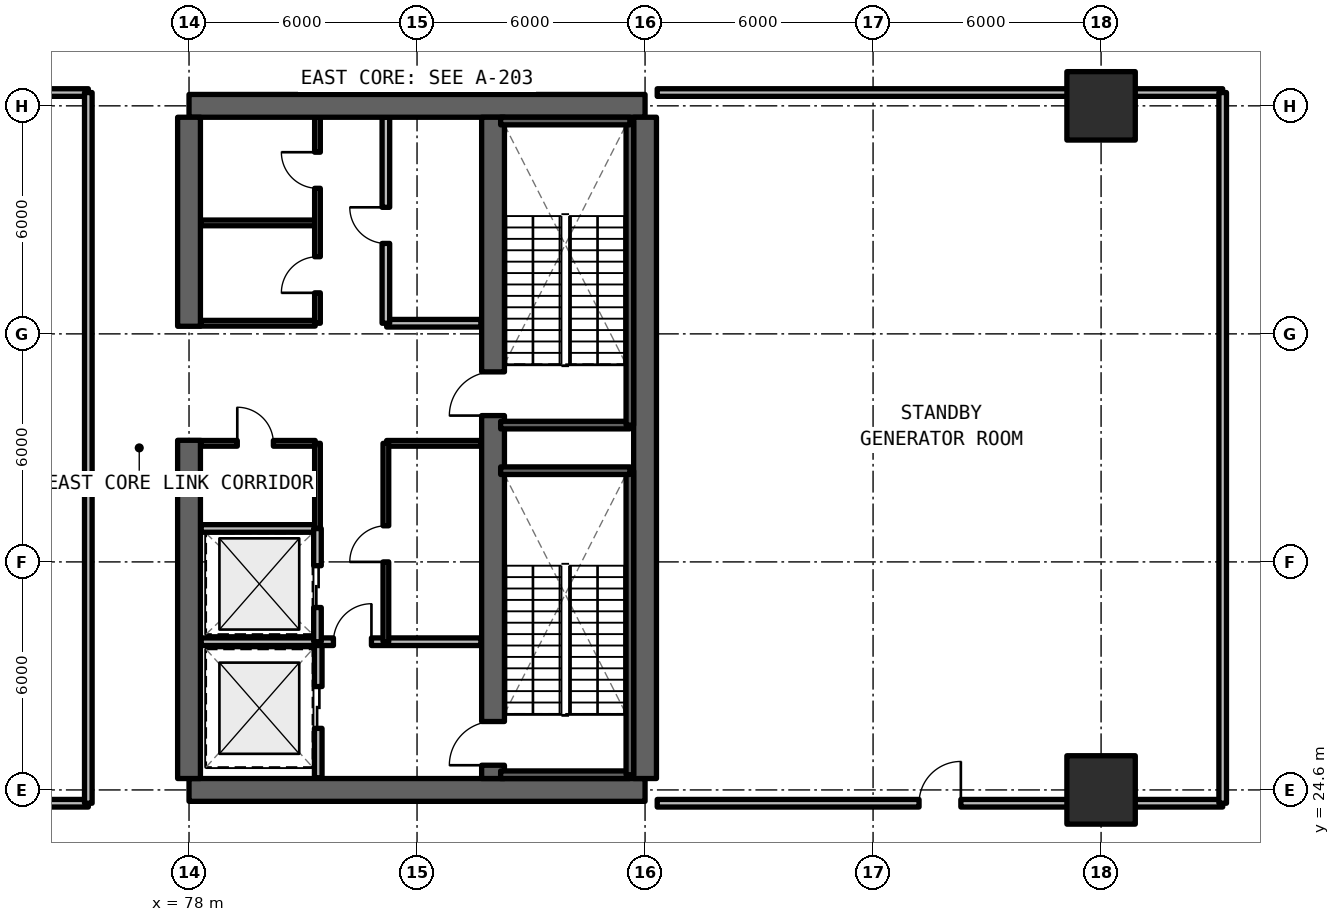
"""IFC4 building model, lengths in metres.
Left out: names, types, materials, properties, quantities, classifications, styles, units other than length and angle.
Written with IfcOpenShell. Run it as: python <this file> out.ifc"""

import sys

from ifc_helpers import new_model, si_unit, direction, frame, frame_2d, origin, origin_2d, place, context, subcontext, project, spatial, rectangle, extrude, element, fill, save


model = new_model("IFC4")
c1 = context("Model", 3, precision=1e-05, world=origin(), true_north=direction((0.0, 1.0)))
c2 = subcontext(c1, "Body", "Model", "MODEL_VIEW")
j1 = project(units=[si_unit("LENGTHUNIT", "METRE"), si_unit("PLANEANGLEUNIT", "RADIAN")], contexts=[c1])
p1 = place(None, origin())
s1 = spatial("IfcSite", under=j1, at=p1, CompositionType="ELEMENT")
p2 = place(p1, origin())
s2 = spatial("IfcBuilding", under=s1, at=p2, CompositionType="ELEMENT")
p3 = place(p2, frame((0.0, 0.0, -4.62)))
s3 = spatial("IfcBuildingStorey", under=s2, at=p3, CompositionType="ELEMENT", Elevation=-4.62)
for number, where, z_axis, x_axis in (
    (1, (78.0, 24.6, 0.0), (0.0, 0.0, 1.0), (1.0, 0.0, 0.0)),
    (2, (90.0, 42.6, 0.0), (0.0, 0.0, 1.0), (-1.0, 0.0, 0.0)),
):
    element("IfcWall", number, at=place(p3, frame(where, z_axis=z_axis, x_axis=x_axis)), inside=s3, PredefinedType="SHEAR", context=c2, shape_type="SweptSolid", body=[
        extrude(rectangle(XDim=12.0, YDim=0.6, at=frame_2d((6.0, 0.0))), origin(), (0.0, 0.0, 1.0), 4.62),
    ])
p4 = place(p3, frame((90.0, 24.9, 0.0), z_axis=(0.0, 0.0, 1.0), x_axis=(0.0, 1.0, 0.0)))
e3 = element("IfcWall", 3, at=p4, inside=s3, PredefinedType="SHEAR", context=c2, shape_type="SweptSolid", body=[
    extrude(rectangle(XDim=17.4, YDim=0.6, at=frame_2d((8.7, 0.0))), origin(), (0.0, 0.0, 1.0), 4.62),
])
p5 = place(p3, frame((78.0, 24.9, 0.0), z_axis=(0.0, 0.0, 1.0), x_axis=(0.0, 1.0, 0.0)))
e4 = element("IfcWall", 4, at=p5, inside=s3, PredefinedType="SHEAR", context=c2, shape_type="SweptSolid", body=[
    extrude(rectangle(XDim=8.9, YDim=0.6, at=frame_2d((4.45, 0.0))), origin(), (0.0, 0.0, 1.0), 4.62),
])
p6 = place(p3, frame((78.0, 36.8, 0.0), z_axis=(0.0, 0.0, 1.0), x_axis=(0.0, 1.0, 0.0)))
e5 = element("IfcWall", 5, at=p6, inside=s3, PredefinedType="SHEAR", context=c2, shape_type="SweptSolid", body=[
    extrude(rectangle(XDim=5.5, YDim=0.6, at=frame_2d((2.75, 0.0))), origin(), (0.0, 0.0, 1.0), 4.62),
])
p7 = place(p3, frame((86.0, 24.9, 0.0), z_axis=(0.0, 0.0, 1.0), x_axis=(0.0, 1.0, 0.0)))
e6 = element("IfcWall", 6, at=p7, inside=s3, PredefinedType="SHEAR", context=c2, shape_type="SweptSolid", body=[
    extrude(rectangle(XDim=17.4, YDim=0.6, at=frame_2d((8.7, 0.0))), origin(), (0.0, 0.0, 1.0), 4.62),
])
p8 = place(p7, frame((0.35, 0.0, 0.0)))
e7 = element("IfcOpeningElement", 7, at=p8, cuts=e6, PredefinedType="OPENING", context=c2, shape_type="SweptSolid", body=[
    extrude(rectangle(XDim=1.15, YDim=2.15, at=frame_2d((0.575, 1.075))), frame((0.0, 0.31, 0.0), z_axis=(0.0, -1.0, 0.0), x_axis=(1.0, 0.0, 0.0)), (0.0, 0.0, 1.0), 0.62),
])
p9 = place(p7, frame((9.55, 0.0, 0.0)))
e8 = element("IfcOpeningElement", 8, at=p9, cuts=e6, PredefinedType="OPENING", context=c2, shape_type="SweptSolid", body=[
    extrude(rectangle(XDim=1.15, YDim=2.15, at=frame_2d((0.575, 1.075))), frame((0.0, 0.31, 0.0), z_axis=(0.0, -1.0, 0.0), x_axis=(1.0, 0.0, 0.0)), (0.0, 0.0, 1.0), 0.62),
])
for number, where, z_axis, x_axis in (
    (9, (102.0, 24.6, 0.0), (0.0, 0.0, 1.0), (1.0, 0.0, 0.0)),
    (10, (102.0, 42.6, 0.0), (0.0, 0.0, 1.0), (1.0, 0.0, 0.0)),
):
    element("IfcColumn", number, at=place(p3, frame(where, z_axis=z_axis, x_axis=x_axis)), inside=s3, PredefinedType="COLUMN", context=c2, shape_type="SweptSolid", body=[
        extrude(rectangle(XDim=1.8, YDim=1.8, at=origin_2d()), origin(), (0.0, 0.0, 1.0), 4.62),
    ])
p10 = place(p3, frame((81.4, 24.92, 0.0), z_axis=(0.0, 0.0, 1.0), x_axis=(0.0, 1.0, 0.0)))
e11 = element("IfcWall", 11, at=p10, inside=s3, PredefinedType="SOLIDWALL", context=c2, shape_type="SweptSolid", body=[
    extrude(rectangle(XDim=3.58, YDim=0.2, at=frame_2d((1.79, 0.0))), origin(), (0.0, 0.0, 1.0), 3.56),
])
p11 = place(p10, frame((1.3, 0.0, 0.0)))
e12 = element("IfcOpeningElement", 12, at=p11, cuts=e11, PredefinedType="OPENING", context=c2, shape_type="SweptSolid", body=[
    extrude(rectangle(XDim=1.1, YDim=2.2, at=frame_2d((0.55, 1.1))), frame((0.0, 0.11, 0.0), z_axis=(0.0, -1.0, 0.0), x_axis=(1.0, 0.0, 0.0)), (0.0, 0.0, 1.0), 0.22),
])
p12 = place(p3, frame((78.32, 28.5, 0.0), z_axis=(0.0, 0.0, 1.0), x_axis=(1.0, 0.0, 0.0)))
e13 = element("IfcWall", 13, at=p12, inside=s3, PredefinedType="SOLIDWALL", context=c2, shape_type="SweptSolid", body=[
    extrude(rectangle(XDim=7.36, YDim=0.2, at=frame_2d((3.68, 0.0))), origin(), (0.0, 0.0, 1.0), 3.56),
])
p13 = place(p12, frame((3.48, 0.0, 0.0)))
e14 = element("IfcOpeningElement", 14, at=p13, cuts=e13, PredefinedType="OPENING", context=c2, shape_type="SweptSolid", body=[
    extrude(rectangle(XDim=1.0, YDim=2.15, at=frame_2d((0.5, 1.075))), frame((0.0, 0.11, 0.0), z_axis=(0.0, -1.0, 0.0), x_axis=(1.0, 0.0, 0.0)), (0.0, 0.0, 1.0), 0.22),
])
p14 = place(p3, frame((83.2, 33.72, 0.0), z_axis=(0.0, 0.0, 1.0), x_axis=(1.0, 0.0, 0.0)))
e15 = element("IfcWall", 15, at=p14, inside=s3, PredefinedType="SOLIDWALL", context=c2, shape_type="SweptSolid", body=[
    extrude(rectangle(XDim=2.48, YDim=0.15, at=frame_2d((1.24, 0.0))), origin(), (0.0, 0.0, 1.0), 3.56),
])
p15 = place(p3, frame((83.18, 28.5, 0.0), z_axis=(0.0, 0.0, 1.0), x_axis=(0.0, 1.0, 0.0)))
e16 = element("IfcWall", 16, at=p15, inside=s3, PredefinedType="SOLIDWALL", context=c2, shape_type="SweptSolid", body=[
    extrude(rectangle(XDim=5.22, YDim=0.15, at=frame_2d((2.61, 0.0))), origin(), (0.0, 0.0, 1.0), 3.56),
])
p16 = place(p15, frame((2.1, 0.0, 0.0)))
e17 = element("IfcOpeningElement", 17, at=p16, cuts=e16, PredefinedType="OPENING", context=c2, shape_type="SweptSolid", body=[
    extrude(rectangle(XDim=0.95, YDim=2.15, at=frame_2d((0.475, 1.075))), frame((0.0, 0.085, 0.0), z_axis=(0.0, -1.0, 0.0), x_axis=(1.0, 0.0, 0.0)), (0.0, 0.0, 1.0), 0.17),
])
p17 = place(p3, frame((78.32, 31.48, 0.0), z_axis=(0.0, 0.0, 1.0), x_axis=(1.0, 0.0, 0.0)))
e18 = element("IfcWall", 18, at=p17, inside=s3, PredefinedType="SOLIDWALL", context=c2, shape_type="SweptSolid", body=[
    extrude(rectangle(XDim=3.0, YDim=0.2, at=frame_2d((1.5, 0.0))), origin(), (0.0, 0.0, 1.0), 3.56),
])
p18 = place(p3, frame((81.38, 28.5, 0.0), z_axis=(0.0, 0.0, 1.0), x_axis=(0.0, 1.0, 0.0)))
e19 = element("IfcWall", 19, at=p18, inside=s3, PredefinedType="SOLIDWALL", context=c2, shape_type="SweptSolid", body=[
    extrude(rectangle(XDim=2.98, YDim=0.2, at=frame_2d((1.49, 0.0))), origin(), (0.0, 0.0, 1.0), 3.56),
])
p19 = place(p18, frame((0.9, 0.0, 0.0)))
e20 = element("IfcOpeningElement", 20, at=p19, cuts=e19, PredefinedType="OPENING", context=c2, shape_type="SweptSolid", body=[
    extrude(rectangle(XDim=1.1, YDim=2.2, at=frame_2d((0.55, 1.1))), frame((0.0, 0.11, 0.0), z_axis=(0.0, -1.0, 0.0), x_axis=(1.0, 0.0, 0.0)), (0.0, 0.0, 1.0), 0.22),
])
p20 = place(p3, frame((81.38, 31.48, 0.0), z_axis=(0.0, 0.0, 1.0), x_axis=(0.0, 1.0, 0.0)))
e21 = element("IfcWall", 21, at=p20, inside=s3, PredefinedType="SOLIDWALL", context=c2, shape_type="SweptSolid", body=[
    extrude(rectangle(XDim=2.24, YDim=0.15, at=frame_2d((1.12, 0.0))), origin(), (0.0, 0.0, 1.0), 3.56),
])
p21 = place(p3, frame((78.32, 33.72, 0.0), z_axis=(0.0, 0.0, 1.0), x_axis=(1.0, 0.0, 0.0)))
e22 = element("IfcWall", 22, at=p21, inside=s3, PredefinedType="SOLIDWALL", context=c2, shape_type="SweptSolid", body=[
    extrude(rectangle(XDim=3.0, YDim=0.15, at=frame_2d((1.5, 0.0))), origin(), (0.0, 0.0, 1.0), 3.56),
])
p22 = place(p21, frame((0.95, 0.0, 0.0)))
e23 = element("IfcOpeningElement", 23, at=p22, cuts=e22, PredefinedType="OPENING", context=c2, shape_type="SweptSolid", body=[
    extrude(rectangle(XDim=0.95, YDim=2.15, at=frame_2d((0.475, 1.075))), frame((0.0, 0.085, 0.0), z_axis=(0.0, -1.0, 0.0), x_axis=(1.0, 0.0, 0.0)), (0.0, 0.0, 1.0), 0.17),
])
p23 = place(p3, frame((83.2, 36.88, 0.0), z_axis=(0.0, 0.0, 1.0), x_axis=(1.0, 0.0, 0.0)))
e24 = element("IfcWall", 24, at=p23, inside=s3, PredefinedType="SOLIDWALL", context=c2, shape_type="SweptSolid", body=[
    extrude(rectangle(XDim=2.48, YDim=0.2, at=frame_2d((1.24, 0.0))), origin(), (0.0, 0.0, 1.0), 3.56),
])
p24 = place(p3, frame((83.18, 36.88, 0.0), z_axis=(0.0, 0.0, 1.0), x_axis=(0.0, 1.0, 0.0)))
e25 = element("IfcWall", 25, at=p24, inside=s3, PredefinedType="SOLIDWALL", context=c2, shape_type="SweptSolid", body=[
    extrude(rectangle(XDim=5.42, YDim=0.2, at=frame_2d((2.71, 0.0))), origin(), (0.0, 0.0, 1.0), 3.56),
])
p25 = place(p24, frame((2.1, 0.0, 0.0)))
e26 = element("IfcOpeningElement", 26, at=p25, cuts=e25, PredefinedType="OPENING", context=c2, shape_type="SweptSolid", body=[
    extrude(rectangle(XDim=0.95, YDim=2.15, at=frame_2d((0.475, 1.075))), frame((0.0, 0.11, 0.0), z_axis=(0.0, -1.0, 0.0), x_axis=(1.0, 0.0, 0.0)), (0.0, 0.0, 1.0), 0.22),
])
for number, where, z_axis, x_axis in (
    (27, (78.32, 36.88, 0.0), (0.0, 0.0, 1.0), (1.0, 0.0, 0.0)),
    (28, (78.32, 39.52, 0.0), (0.0, 0.0, 1.0), (1.0, 0.0, 0.0)),
):
    element("IfcWall", number, at=place(p3, frame(where, z_axis=z_axis, x_axis=x_axis)), inside=s3, PredefinedType="SOLIDWALL", context=c2, shape_type="SweptSolid", body=[
        extrude(rectangle(XDim=3.0, YDim=0.15, at=frame_2d((1.5, 0.0))), origin(), (0.0, 0.0, 1.0), 3.56),
    ])
p26 = place(p3, frame((81.38, 36.88, 0.0), z_axis=(0.0, 0.0, 1.0), x_axis=(0.0, 1.0, 0.0)))
e29 = element("IfcWall", 29, at=p26, inside=s3, PredefinedType="SOLIDWALL", context=c2, shape_type="SweptSolid", body=[
    extrude(rectangle(XDim=5.42, YDim=0.15, at=frame_2d((2.71, 0.0))), origin(), (0.0, 0.0, 1.0), 3.56),
])
p27 = place(p26, frame((0.8, 0.0, 0.0)))
e30 = element("IfcOpeningElement", 30, at=p27, cuts=e29, PredefinedType="OPENING", context=c2, shape_type="SweptSolid", body=[
    extrude(rectangle(XDim=0.95, YDim=2.15, at=frame_2d((0.475, 1.075))), frame((0.0, 0.085, 0.0), z_axis=(0.0, -1.0, 0.0), x_axis=(1.0, 0.0, 0.0)), (0.0, 0.0, 1.0), 0.17),
])
p28 = place(p26, frame((3.55, 0.0, 0.0)))
e31 = element("IfcOpeningElement", 31, at=p28, cuts=e29, PredefinedType="OPENING", context=c2, shape_type="SweptSolid", body=[
    extrude(rectangle(XDim=0.95, YDim=2.15, at=frame_2d((0.475, 1.075))), frame((0.0, 0.085, 0.0), z_axis=(0.0, -1.0, 0.0), x_axis=(1.0, 0.0, 0.0)), (0.0, 0.0, 1.0), 0.17),
])
p29 = place(p3, frame((90.32, 24.25, 0.0), z_axis=(0.0, 0.0, 1.0), x_axis=(1.0, 0.0, 0.0)))
e32 = element("IfcWall", 32, at=p29, inside=s3, PredefinedType="SOLIDWALL", context=c2, shape_type="SweptSolid", body=[
    extrude(rectangle(XDim=14.88, YDim=0.2, at=frame_2d((7.44, 0.0))), origin(), (0.0, 0.0, 1.0), 3.56),
])
p30 = place(p29, frame((6.89, 0.0, 0.0)))
e33 = element("IfcOpeningElement", 33, at=p30, cuts=e32, PredefinedType="OPENING", context=c2, shape_type="SweptSolid", body=[
    extrude(rectangle(XDim=1.1, YDim=2.15, at=frame_2d((0.55, 1.075))), frame((0.0, 0.11, 0.0), z_axis=(0.0, -1.0, 0.0), x_axis=(1.0, 0.0, 0.0)), (0.0, 0.0, 1.0), 0.22),
])
p31 = place(p3, frame((90.32, 42.95, 0.0), z_axis=(0.0, 0.0, 1.0), x_axis=(1.0, 0.0, 0.0)))
e34 = element("IfcWall", 34, at=p31, inside=s3, PredefinedType="SOLIDWALL", context=c2, shape_type="SweptSolid", body=[
    extrude(rectangle(XDim=14.88, YDim=0.2, at=frame_2d((7.44, 0.0))), origin(), (0.0, 0.0, 1.0), 3.56),
])
p32 = place(p3, frame((105.2, 24.25, 0.0), z_axis=(0.0, 0.0, 1.0), x_axis=(0.0, 1.0, 0.0)))
e35 = element("IfcWall", 35, at=p32, inside=s3, PredefinedType="SOLIDWALL", context=c2, shape_type="SweptSolid", body=[
    extrude(rectangle(XDim=18.7, YDim=0.2, at=frame_2d((9.35, 0.0))), origin(), (0.0, 0.0, 1.0), 3.56),
])
for number, where, z_axis, x_axis in (
    (36, (38.65, 24.25, 0.0), (0.0, 0.0, 1.0), (1.0, 0.0, 0.0)),
    (37, (38.65, 42.95, 0.0), (0.0, 0.0, 1.0), (1.0, 0.0, 0.0)),
):
    element("IfcWall", number, at=place(p3, frame(where, z_axis=z_axis, x_axis=x_axis)), inside=s3, PredefinedType="SOLIDWALL", context=c2, shape_type="SweptSolid", body=[
        extrude(rectangle(XDim=36.7, YDim=0.2, at=frame_2d((18.35, 0.0))), origin(), (0.0, 0.0, 1.0), 3.56),
    ])
p33 = place(p3, frame((75.35, 24.25, 0.0), z_axis=(0.0, 0.0, 1.0), x_axis=(0.0, 1.0, 0.0)))
e38 = element("IfcWall", 38, at=p33, inside=s3, PredefinedType="SOLIDWALL", context=c2, shape_type="SweptSolid", body=[
    extrude(rectangle(XDim=18.7, YDim=0.2, at=frame_2d((9.35, 0.0))), origin(), (0.0, 0.0, 1.0), 3.56),
])
p34 = place(p3, frame((86.2, 25.0, 0.0), z_axis=(0.0, 0.0, 1.0), x_axis=(1.0, 0.0, 0.0)))
e39 = element("IfcWall", 39, at=p34, inside=s3, PredefinedType="SOLIDWALL", context=c2, shape_type="SweptSolid", body=[
    extrude(rectangle(XDim=3.4, YDim=0.2, at=frame_2d((1.7, 0.0))), origin(), (0.0, 0.0, 1.0), 4.62),
])
p35 = place(p3, frame((89.6, 25.0, 0.0), z_axis=(0.0, 0.0, 1.0), x_axis=(0.0, 1.0, 0.0)))
e40 = element("IfcWall", 40, at=p35, inside=s3, PredefinedType="SOLIDWALL", context=c2, shape_type="SweptSolid", body=[
    extrude(rectangle(XDim=8.0, YDim=0.2, at=frame_2d((4.0, 0.0))), origin(), (0.0, 0.0, 1.0), 4.62),
])
for number, where, z_axis, x_axis in (
    (41, (89.6, 33.0, 0.0), (0.0, 0.0, 1.0), (-1.0, 0.0, 0.0)),
    (42, (86.2, 34.2, 0.0), (0.0, 0.0, 1.0), (1.0, 0.0, 0.0)),
):
    element("IfcWall", number, at=place(p3, frame(where, z_axis=z_axis, x_axis=x_axis)), inside=s3, PredefinedType="SOLIDWALL", context=c2, shape_type="SweptSolid", body=[
        extrude(rectangle(XDim=3.4, YDim=0.2, at=frame_2d((1.7, 0.0))), origin(), (0.0, 0.0, 1.0), 4.62),
    ])
p36 = place(p3, frame((89.6, 34.2, 0.0), z_axis=(0.0, 0.0, 1.0), x_axis=(0.0, 1.0, 0.0)))
e43 = element("IfcWall", 43, at=p36, inside=s3, PredefinedType="SOLIDWALL", context=c2, shape_type="SweptSolid", body=[
    extrude(rectangle(XDim=8.0, YDim=0.2, at=frame_2d((4.0, 0.0))), origin(), (0.0, 0.0, 1.0), 4.62),
])
p37 = place(p3, frame((89.6, 42.2, 0.0), z_axis=(0.0, 0.0, 1.0), x_axis=(-1.0, 0.0, 0.0)))
e44 = element("IfcWall", 44, at=p37, inside=s3, PredefinedType="SOLIDWALL", context=c2, shape_type="SweptSolid", body=[
    extrude(rectangle(XDim=3.4, YDim=0.2, at=frame_2d((1.7, 0.0))), origin(), (0.0, 0.0, 1.0), 4.62),
])
p38 = place(p11, origin())
e45 = element("IfcDoor", 45, at=p38, inside=s3, OperationType="SLIDING_TO_LEFT", PredefinedType="DOOR", context=c2, shape_type="SweptSolid", body=[
    extrude(rectangle(XDim=1.1, YDim=2.2, at=frame_2d((0.55, 1.1))), frame((0.0, 0.025, 0.0), z_axis=(0.0, -1.0, 0.0), x_axis=(1.0, 0.0, 0.0)), (0.0, 0.0, 1.0), 0.05),
])
fill(e12, e45)
p39 = place(p13, origin())
e46 = element("IfcDoor", 46, at=p39, inside=s3, OperationType="SINGLE_SWING_RIGHT", PredefinedType="DOOR", context=c2, shape_type="SweptSolid", body=[
    extrude(rectangle(XDim=1.0, YDim=2.15, at=frame_2d((0.5, 1.075))), frame((0.0, 0.025, 0.0), z_axis=(0.0, -1.0, 0.0), x_axis=(1.0, 0.0, 0.0)), (0.0, 0.0, 1.0), 0.05),
])
fill(e14, e46)
p40 = place(p16, origin())
e47 = element("IfcDoor", 47, at=p40, inside=s3, OperationType="SINGLE_SWING_LEFT", PredefinedType="DOOR", context=c2, shape_type="SweptSolid", body=[
    extrude(rectangle(XDim=0.95, YDim=2.15, at=frame_2d((0.475, 1.075))), frame((0.0, 0.025, 0.0), z_axis=(0.0, -1.0, 0.0), x_axis=(1.0, 0.0, 0.0)), (0.0, 0.0, 1.0), 0.05),
])
fill(e17, e47)
p41 = place(p19, origin())
e48 = element("IfcDoor", 48, at=p41, inside=s3, OperationType="SLIDING_TO_LEFT", PredefinedType="DOOR", context=c2, shape_type="SweptSolid", body=[
    extrude(rectangle(XDim=1.1, YDim=2.2, at=frame_2d((0.55, 1.1))), frame((0.0, 0.025, 0.0), z_axis=(0.0, -1.0, 0.0), x_axis=(1.0, 0.0, 0.0)), (0.0, 0.0, 1.0), 0.05),
])
fill(e20, e48)
p42 = place(p22, origin())
e49 = element("IfcDoor", 49, at=p42, inside=s3, OperationType="SINGLE_SWING_LEFT", PredefinedType="DOOR", context=c2, shape_type="SweptSolid", body=[
    extrude(rectangle(XDim=0.95, YDim=2.15, at=frame_2d((0.475, 1.075))), frame((0.0, 0.025, 0.0), z_axis=(0.0, -1.0, 0.0), x_axis=(1.0, 0.0, 0.0)), (0.0, 0.0, 1.0), 0.05),
])
fill(e23, e49)
p43 = place(p25, origin())
e50 = element("IfcDoor", 50, at=p43, inside=s3, OperationType="SINGLE_SWING_RIGHT", PredefinedType="DOOR", context=c2, shape_type="SweptSolid", body=[
    extrude(rectangle(XDim=0.95, YDim=2.15, at=frame_2d((0.475, 1.075))), frame((0.0, 0.025, 0.0), z_axis=(0.0, -1.0, 0.0), x_axis=(1.0, 0.0, 0.0)), (0.0, 0.0, 1.0), 0.05),
])
fill(e26, e50)
p44 = place(p27, origin())
e51 = element("IfcDoor", 51, at=p44, inside=s3, OperationType="SINGLE_SWING_LEFT", PredefinedType="DOOR", context=c2, shape_type="SweptSolid", body=[
    extrude(rectangle(XDim=0.95, YDim=2.15, at=frame_2d((0.475, 1.075))), frame((0.0, 0.025, 0.0), z_axis=(0.0, -1.0, 0.0), x_axis=(1.0, 0.0, 0.0)), (0.0, 0.0, 1.0), 0.05),
])
fill(e30, e51)
p45 = place(p28, origin())
e52 = element("IfcDoor", 52, at=p45, inside=s3, OperationType="SINGLE_SWING_RIGHT", PredefinedType="DOOR", context=c2, shape_type="SweptSolid", body=[
    extrude(rectangle(XDim=0.95, YDim=2.15, at=frame_2d((0.475, 1.075))), frame((0.0, 0.025, 0.0), z_axis=(0.0, -1.0, 0.0), x_axis=(1.0, 0.0, 0.0)), (0.0, 0.0, 1.0), 0.05),
])
fill(e31, e52)
p46 = place(p30, origin())
e53 = element("IfcDoor", 53, at=p46, inside=s3, OperationType="SINGLE_SWING_RIGHT", PredefinedType="DOOR", context=c2, shape_type="SweptSolid", body=[
    extrude(rectangle(XDim=1.1, YDim=2.15, at=frame_2d((0.55, 1.075))), frame((0.0, 0.025, 0.0), z_axis=(0.0, -1.0, 0.0), x_axis=(1.0, 0.0, 0.0)), (0.0, 0.0, 1.0), 0.05),
])
fill(e33, e53)
p47 = place(p8, origin())
e54 = element("IfcDoor", 54, at=p47, inside=s3, OperationType="SINGLE_SWING_RIGHT", PredefinedType="DOOR", context=c2, shape_type="SweptSolid", body=[
    extrude(rectangle(XDim=1.15, YDim=2.15, at=frame_2d((0.575, 1.075))), frame((0.0, 0.025, 0.0), z_axis=(0.0, -1.0, 0.0), x_axis=(1.0, 0.0, 0.0)), (0.0, 0.0, 1.0), 0.05),
])
fill(e7, e54)
p48 = place(p9, origin())
e55 = element("IfcDoor", 55, at=p48, inside=s3, OperationType="SINGLE_SWING_LEFT", PredefinedType="DOOR", context=c2, shape_type="SweptSolid", body=[
    extrude(rectangle(XDim=1.15, YDim=2.15, at=frame_2d((0.575, 1.075))), frame((0.0, 0.025, 0.0), z_axis=(0.0, -1.0, 0.0), x_axis=(1.0, 0.0, 0.0)), (0.0, 0.0, 1.0), 0.05),
])
fill(e8, e55)
save(model, sys.argv[1])
